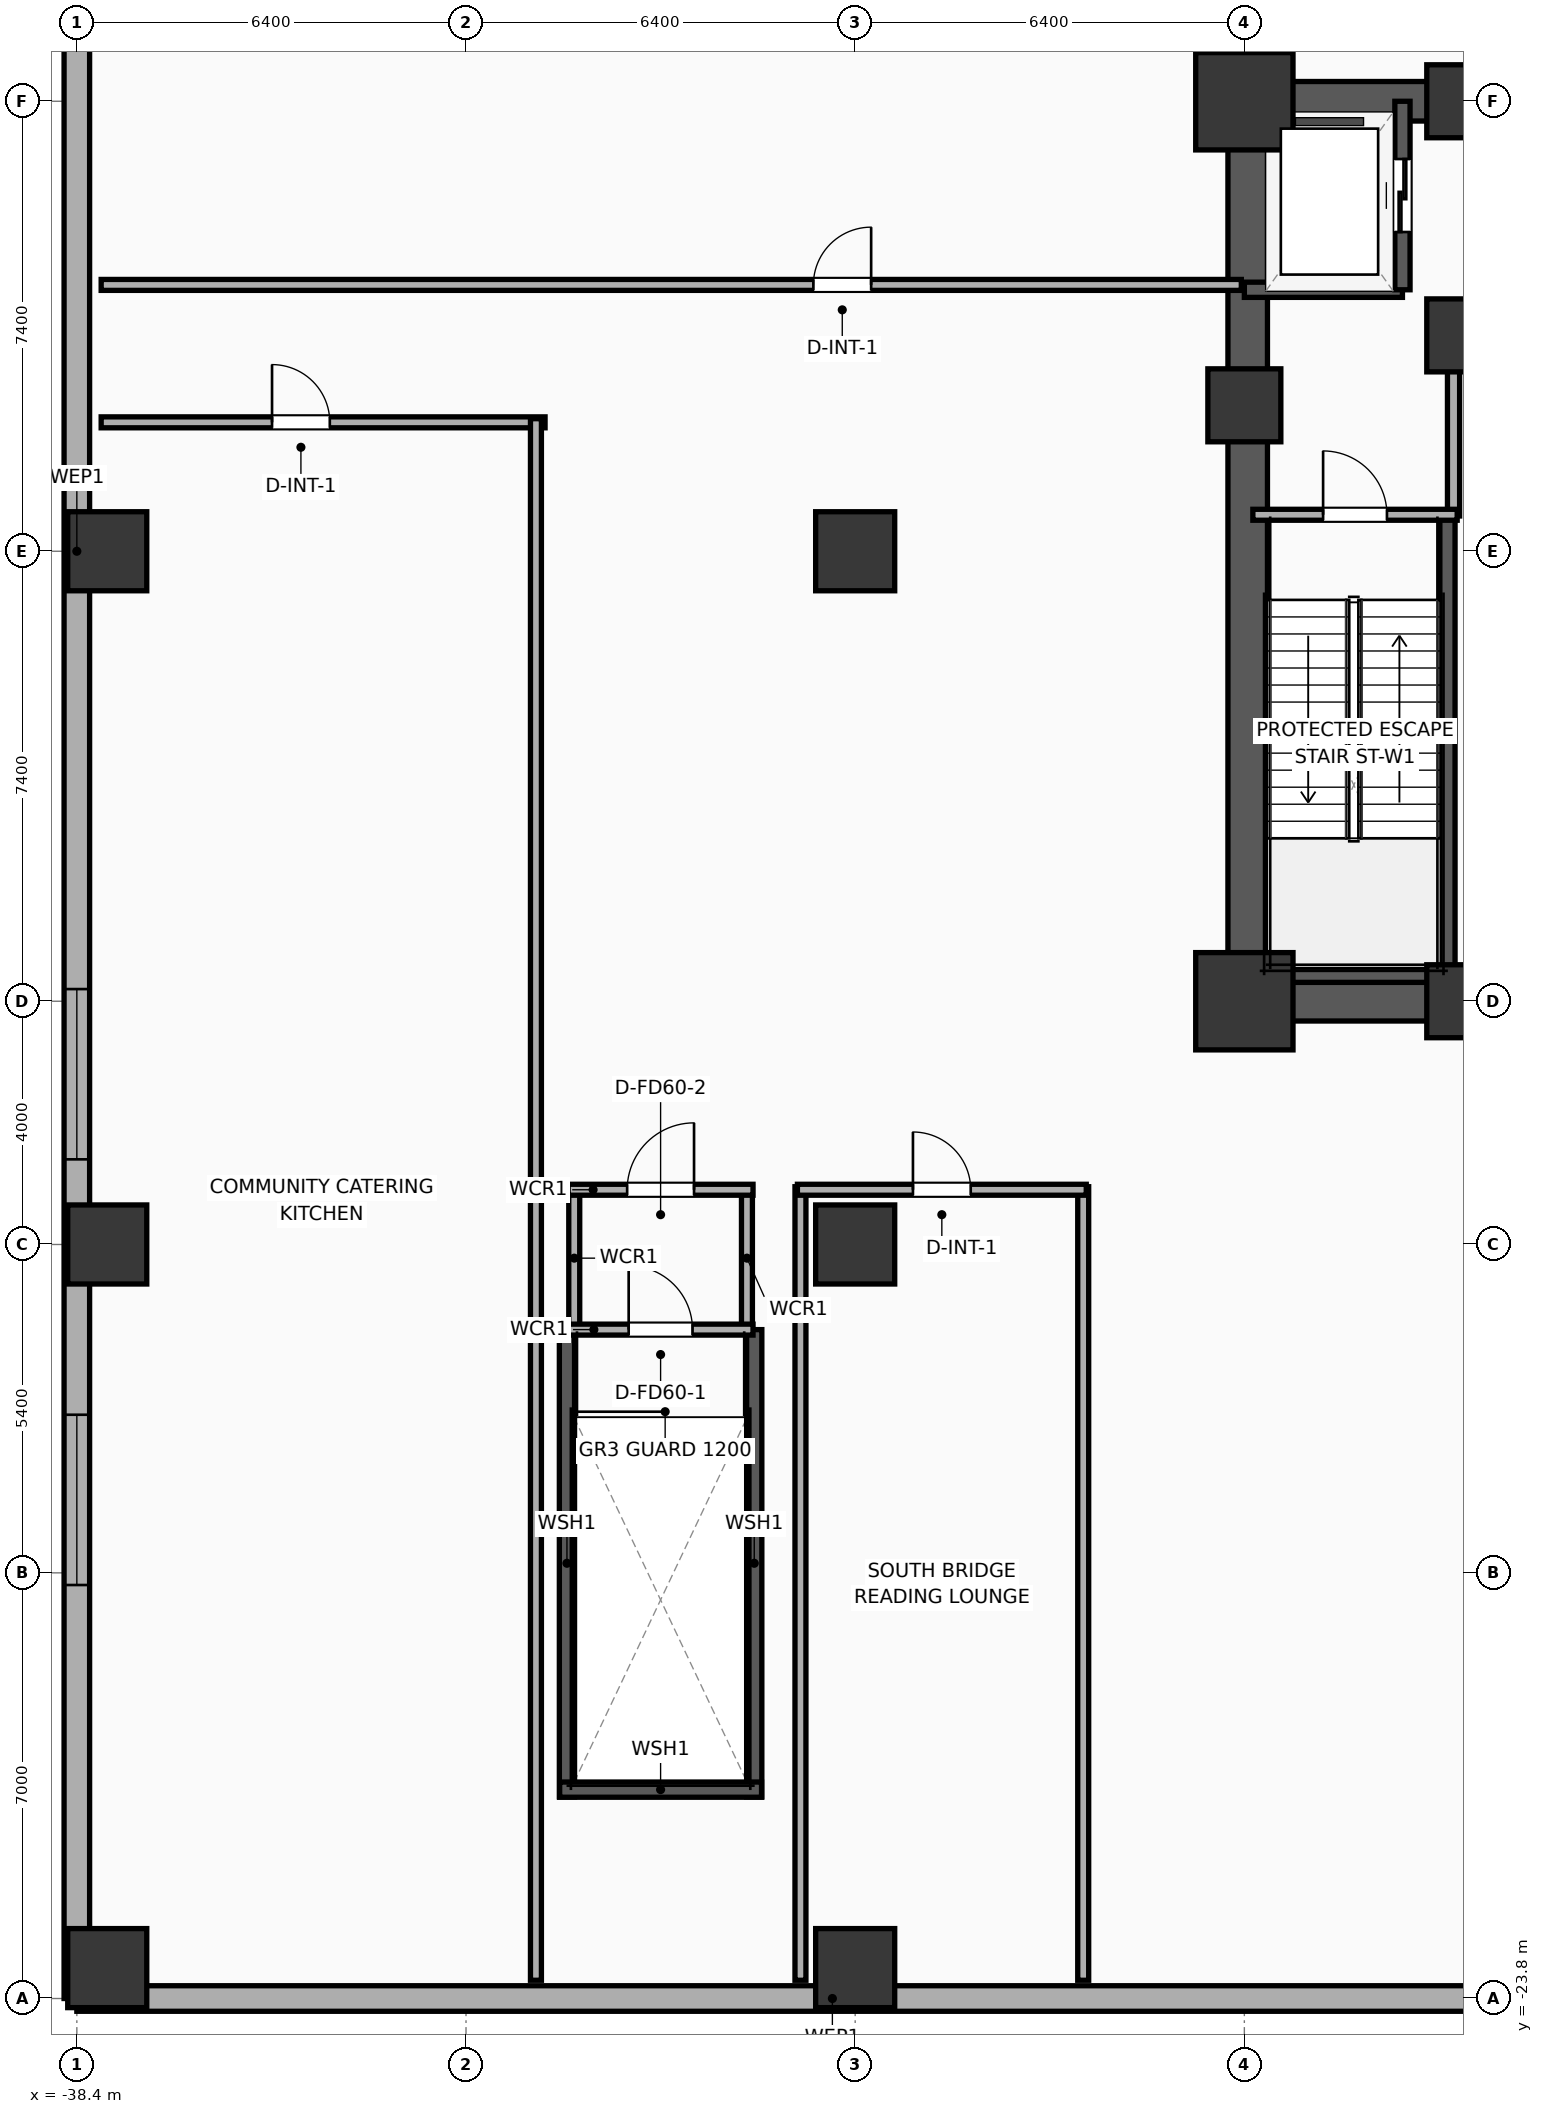
"""IFC4 building model, lengths in metres.
Left out: names, types, materials, properties, quantities, classifications, styles, units other than length and angle.
Written with IfcOpenShell. Run it as: python <this file> out.ifc"""

import sys

from ifc_helpers import new_model, si_unit, direction, frame, frame_2d, origin, origin_2d, place, context, subcontext, project, spatial, rectangle, extrude, element, fill, save


model = new_model("IFC4")
c1 = context("Model", 3, precision=1e-05, world=origin(), true_north=direction((0.0, 1.0)))
c2 = subcontext(c1, "Body", "Model", "MODEL_VIEW")
j1 = project(units=[si_unit("LENGTHUNIT", "METRE"), si_unit("PLANEANGLEUNIT", "RADIAN")], contexts=[c1])
p1 = place(None, origin())
s1 = spatial("IfcSite", under=j1, at=p1, CompositionType="ELEMENT")
p2 = place(p1, origin())
s2 = spatial("IfcBuilding", under=s1, at=p2, CompositionType="ELEMENT")
p3 = place(p2, frame((0.0, 0.0, 20.8)))
s3 = spatial("IfcBuildingStorey", under=s2, at=p3, CompositionType="ELEMENT", Elevation=20.8)
p4 = place(p3, frame((-19.2, -7.4, 0.0), z_axis=(0.0, 0.0, 1.0), x_axis=(1.0, 0.0, 0.0)))
e1 = element("IfcColumn", 1, at=p4, inside=s3, PredefinedType="COLUMN", context=c2, shape_type="SweptSolid", body=[
    extrude(rectangle(XDim=1.6, YDim=1.6, at=origin_2d()), origin(), (0.0, 0.0, 1.0), 5.2),
])
p5 = place(p3, frame((-19.2, 2.4, 0.0), z_axis=(0.0, 0.0, 1.0), x_axis=(1.0, 0.0, 0.0)))
e2 = element("IfcColumn", 2, at=p5, inside=s3, PredefinedType="COLUMN", context=c2, shape_type="SweptSolid", body=[
    extrude(rectangle(XDim=1.2, YDim=1.2, at=origin_2d()), origin(), (0.0, 0.0, 1.0), 5.2),
])
p6 = place(p3, frame((-19.2, 7.4, 0.0), z_axis=(0.0, 0.0, 1.0), x_axis=(1.0, 0.0, 0.0)))
e3 = element("IfcColumn", 3, at=p6, inside=s3, PredefinedType="COLUMN", context=c2, shape_type="SweptSolid", body=[
    extrude(rectangle(XDim=1.6, YDim=1.6, at=origin_2d()), origin(), (0.0, 0.0, 1.0), 5.2),
])
for number, where, z_axis, x_axis in (
    (4, (-15.6, -7.4, 0.0), (0.0, 0.0, 1.0), (1.0, 0.0, 0.0)),
    (5, (-15.6, 7.4, 0.0), (0.0, 0.0, 1.0), (1.0, 0.0, 0.0)),
    (6, (-15.6, 3.55, 0.0), (0.0, 0.0, 1.0), (1.0, 0.0, 0.0)),
):
    element("IfcColumn", number, at=place(p3, frame(where, z_axis=z_axis, x_axis=x_axis)), inside=s3, PredefinedType="COLUMN", context=c2, shape_type="SweptSolid", body=[
        extrude(rectangle(XDim=1.2, YDim=1.2, at=origin_2d()), origin(), (0.0, 0.0, 1.0), 5.2),
    ])
for number, where, z_axis, x_axis in (
    (7, (-19.525, -7.4, 0.0), (0.0, 0.0, 1.0), (1.0, 0.0, 0.0)),
    (8, (-19.525, 7.4, 0.0), (0.0, 0.0, 1.0), (1.0, 0.0, 0.0)),
):
    element("IfcWall", number, at=place(p3, frame(where, z_axis=z_axis, x_axis=x_axis)), inside=s3, PredefinedType="SHEAR", context=c2, shape_type="SweptSolid", body=[
        extrude(rectangle(XDim=7.45, YDim=0.65, at=frame_2d((3.725, 0.0))), origin(), (0.0, 0.0, 1.0), 4.95),
    ])
p7 = place(p3, frame((-19.145, -7.4, 0.0), z_axis=(0.0, 0.0, 1.0), x_axis=(0.0, 1.0, 0.0)))
e9 = element("IfcWall", 9, at=p7, inside=s3, PredefinedType="SHEAR", context=c2, shape_type="SweptSolid", body=[
    extrude(rectangle(XDim=14.8, YDim=0.65, at=frame_2d((7.4, 0.0))), origin(), (0.0, 0.0, 1.0), 4.95),
])
p8 = place(p3, frame((-15.86, -7.085, 0.0), z_axis=(0.0, 0.0, 1.0), x_axis=(0.0, 1.0, 0.0)))
e10 = element("IfcWall", 10, at=p8, inside=s3, PredefinedType="SOLIDWALL", context=c2, shape_type="SweptSolid", body=[
    extrude(rectangle(XDim=7.685, YDim=0.25, at=frame_2d((3.843, 0.0))), origin(), (0.0, 0.0, 1.0), 4.95),
])
p9 = place(p3, frame((-19.2, -6.965, 0.0), z_axis=(0.0, 0.0, 1.0), x_axis=(1.0, 0.0, 0.0)))
e11 = element("IfcWall", 11, at=p9, inside=s3, PredefinedType="SOLIDWALL", context=c2, shape_type="SweptSolid", body=[
    extrude(rectangle(XDim=3.46, YDim=0.25, at=frame_2d((1.73, 0.0))), origin(), (0.0, 0.0, 1.0), 4.95),
])
for number, where, z_axis, x_axis in (
    (12, (-30.34, -20.485, 0.0), (0.0, 0.0, 1.0), (0.0, 1.0, 0.0)),
    (13, (-27.26, -20.485, 0.0), (0.0, 0.0, 1.0), (0.0, 1.0, 0.0)),
):
    element("IfcWall", number, at=place(p3, frame(where, z_axis=z_axis, x_axis=x_axis)), inside=s3, PredefinedType="SOLIDWALL", context=c2, shape_type="SweptSolid", body=[
        extrude(rectangle(XDim=7.685, YDim=0.25, at=frame_2d((3.843, 0.0))), origin(), (0.0, 0.0, 1.0), 4.95),
    ])
p10 = place(p3, frame((-30.46, -20.365, 0.0), z_axis=(0.0, 0.0, 1.0), x_axis=(1.0, 0.0, 0.0)))
e14 = element("IfcWall", 14, at=p10, inside=s3, PredefinedType="SOLIDWALL", context=c2, shape_type="SweptSolid", body=[
    extrude(rectangle(XDim=3.32, YDim=0.25, at=frame_2d((1.66, 0.0))), origin(), (0.0, 0.0, 1.0), 4.95),
])
for number, where, z_axis, x_axis in (
    (15, (-37.9, -23.3, 0.0), (0.0, 0.0, 1.0), (1.0, 0.0, 0.0)),
    (16, (-37.9, -11.4, 0.0), (0.0, 0.0, 1.0), (1.0, 0.0, 0.0)),
    (17, (-37.9, 0.0, 0.0), (0.0, 0.0, 1.0), (1.0, 0.0, 0.0)),
    (18, (-25.6, -23.3, 0.0), (0.0, 0.0, 1.0), (1.0, 0.0, 0.0)),
    (19, (-25.6, -11.4, 0.0), (0.0, 0.0, 1.0), (1.0, 0.0, 0.0)),
    (20, (-25.6, 0.0, 0.0), (0.0, 0.0, 1.0), (1.0, 0.0, 0.0)),
):
    element("IfcColumn", number, at=place(p3, frame(where, z_axis=z_axis, x_axis=x_axis)), inside=s3, PredefinedType="COLUMN", context=c2, shape_type="SweptSolid", body=[
        extrude(rectangle(XDim=1.3, YDim=1.3, at=origin_2d()), origin(), (0.0, 0.0, 1.0), 5.2),
    ])
p11 = place(p3, frame((-38.4, -23.8, 0.0), z_axis=(0.0, 0.0, 1.0), x_axis=(1.0, 0.0, 0.0)))
e21 = element("IfcWall", 21, at=p11, inside=s3, PredefinedType="ELEMENTEDWALL", context=c2, shape_type="SweptSolid", body=[
    extrude(rectangle(XDim=24.85, YDim=0.42, at=frame_2d((12.425, 0.0))), origin(), (0.0, 0.0, 1.0), 3.84),
])
p12 = place(p3, frame((-38.4, 23.8, 0.0), z_axis=(0.0, 0.0, 1.0), x_axis=(0.0, -1.0, 0.0)))
e22 = element("IfcWall", 22, at=p12, inside=s3, PredefinedType="ELEMENTEDWALL", context=c2, shape_type="SweptSolid", body=[
    extrude(rectangle(XDim=47.6, YDim=0.42, at=frame_2d((23.8, 0.0))), origin(), (0.0, 0.0, 1.0), 4.95),
])
p13 = place(p12, frame((3.0, 0.0, 0.65)))
e23 = element("IfcOpeningElement", 23, at=p13, cuts=e22, PredefinedType="OPENING", context=c2, shape_type="SweptSolid", body=[
    extrude(rectangle(XDim=2.8, YDim=2.6, at=frame_2d((1.4, 1.3))), frame((0.0, 0.22, 0.0), z_axis=(0.0, -1.0, 0.0), x_axis=(1.0, 0.0, 0.0)), (0.0, 0.0, 1.0), 0.44),
])
p14 = place(p12, frame((31.0, 0.0, 0.65)))
e24 = element("IfcOpeningElement", 24, at=p14, cuts=e22, PredefinedType="OPENING", context=c2, shape_type="SweptSolid", body=[
    extrude(rectangle(XDim=2.8, YDim=2.6, at=frame_2d((1.4, 1.3))), frame((0.0, 0.22, 0.0), z_axis=(0.0, -1.0, 0.0), x_axis=(1.0, 0.0, 0.0)), (0.0, 0.0, 1.0), 0.44),
])
p15 = place(p12, frame((38.0, 0.0, 0.65)))
e25 = element("IfcOpeningElement", 25, at=p15, cuts=e22, PredefinedType="OPENING", context=c2, shape_type="SweptSolid", body=[
    extrude(rectangle(XDim=2.8, YDim=2.6, at=frame_2d((1.4, 1.3))), frame((0.0, 0.22, 0.0), z_axis=(0.0, -1.0, 0.0), x_axis=(1.0, 0.0, 0.0)), (0.0, 0.0, 1.0), 0.44),
])
p16 = place(p3, frame((-19.2, 4.3, 0.0), z_axis=(0.0, 0.0, 1.0), x_axis=(1.0, 0.0, 0.0)))
e26 = element("IfcWall", 26, at=p16, inside=s3, PredefinedType="SOLIDWALL", context=c2, shape_type="SweptSolid", body=[
    extrude(rectangle(XDim=2.6, YDim=0.25, at=frame_2d((1.3, 0.0))), origin(), (0.0, 0.0, 1.0), 4.95),
])
p17 = place(p3, frame((-16.6, 4.3, 0.0), z_axis=(0.0, 0.0, 1.0), x_axis=(0.0, 1.0, 0.0)))
e27 = element("IfcWall", 27, at=p17, inside=s3, PredefinedType="SOLIDWALL", context=c2, shape_type="SweptSolid", body=[
    extrude(rectangle(XDim=3.1, YDim=0.25, at=frame_2d((1.55, 0.0))), origin(), (0.0, 0.0, 1.0), 4.95),
])
p18 = place(p17, frame((0.95, 0.0, 0.0)))
e28 = element("IfcOpeningElement", 28, at=p18, cuts=e27, PredefinedType="OPENING", context=c2, shape_type="SweptSolid", body=[
    extrude(rectangle(XDim=1.2, YDim=2.05, at=frame_2d((0.6, 1.025))), frame((0.0, 0.135, 0.0), z_axis=(0.0, -1.0, 0.0), x_axis=(1.0, 0.0, 0.0)), (0.0, 0.0, 1.0), 0.27),
])
p19 = place(p3, frame((-15.76, 0.58, 0.0), z_axis=(0.0, 0.0, 1.0), x_axis=(0.0, 1.0, 0.0)))
e29 = element("IfcWall", 29, at=p19, inside=s3, PredefinedType="PARTITIONING", context=c2, shape_type="SweptSolid", body=[
    extrude(rectangle(XDim=2.52, YDim=0.2, at=frame_2d((1.26, 0.0))), origin(), (0.0, 0.0, 1.0), 4.95),
])
p20 = place(p3, frame((-15.82, 3.06, 0.0), z_axis=(0.0, 0.0, 1.0), x_axis=(1.0, 0.0, 0.0)))
e30 = element("IfcWall", 30, at=p20, inside=s3, PredefinedType="PARTITIONING", context=c2, shape_type="SweptSolid", body=[
    extrude(rectangle(XDim=3.16, YDim=0.2, at=frame_2d((1.58, 0.0))), origin(), (0.0, 0.0, 1.0), 4.95),
])
p21 = place(p3, frame((-19.06, 0.6, 0.0), z_axis=(0.0, 0.0, 1.0), x_axis=(1.0, 0.0, 0.0)))
e31 = element("IfcWall", 31, at=p21, inside=s3, PredefinedType="PARTITIONING", context=c2, shape_type="SweptSolid", body=[
    extrude(rectangle(XDim=3.36, YDim=0.18, at=frame_2d((1.68, 0.0))), origin(), (0.0, 0.0, 1.0), 4.95),
])
p22 = place(p21, frame((1.155, 0.0, 0.0)))
e32 = element("IfcOpeningElement", 32, at=p22, cuts=e31, PredefinedType="OPENING", context=c2, shape_type="SweptSolid", body=[
    extrude(rectangle(XDim=1.05, YDim=2.05, at=frame_2d((0.525, 1.025))), frame((0.0, 0.1, 0.0), z_axis=(0.0, -1.0, 0.0), x_axis=(1.0, 0.0, 0.0)), (0.0, 0.0, 1.0), 0.2),
])
for number, where, z_axis, x_axis in (
    (33, (-30.22, -12.8, 0.0), (0.0, 0.0, 1.0), (0.0, 1.0, 0.0)),
    (34, (-27.38, -12.8, 0.0), (0.0, 0.0, 1.0), (0.0, 1.0, 0.0)),
):
    element("IfcWall", number, at=place(p3, frame(where, z_axis=z_axis, x_axis=x_axis)), inside=s3, PredefinedType="PARTITIONING", context=c2, shape_type="SweptSolid", body=[
        extrude(rectangle(XDim=2.35, YDim=0.18, at=frame_2d((1.175, 0.0))), origin(), (0.0, 0.0, 1.0), 4.95),
    ])
p23 = place(p3, frame((-30.32, -12.8, 0.0), z_axis=(0.0, 0.0, 1.0), x_axis=(1.0, 0.0, 0.0)))
e35 = element("IfcWall", 35, at=p23, inside=s3, PredefinedType="PARTITIONING", context=c2, shape_type="SweptSolid", body=[
    extrude(rectangle(XDim=3.04, YDim=0.18, at=frame_2d((1.52, 0.0))), origin(), (0.0, 0.0, 1.0), 4.95),
])
p24 = place(p23, frame((0.995, 0.0, 0.0)))
e36 = element("IfcOpeningElement", 36, at=p24, cuts=e35, PredefinedType="OPENING", context=c2, shape_type="SweptSolid", body=[
    extrude(rectangle(XDim=1.05, YDim=2.05, at=frame_2d((0.525, 1.025))), frame((0.0, 0.1, 0.0), z_axis=(0.0, -1.0, 0.0), x_axis=(1.0, 0.0, 0.0)), (0.0, 0.0, 1.0), 0.2),
])
p25 = place(p3, frame((-30.32, -10.5, 0.0), z_axis=(0.0, 0.0, 1.0), x_axis=(1.0, 0.0, 0.0)))
e37 = element("IfcWall", 37, at=p25, inside=s3, PredefinedType="PARTITIONING", context=c2, shape_type="SweptSolid", body=[
    extrude(rectangle(XDim=3.04, YDim=0.18, at=frame_2d((1.52, 0.0))), origin(), (0.0, 0.0, 1.0), 4.95),
])
p26 = place(p25, frame((0.97, 0.0, 0.0)))
e38 = element("IfcOpeningElement", 38, at=p26, cuts=e37, PredefinedType="OPENING", context=c2, shape_type="SweptSolid", body=[
    extrude(rectangle(XDim=1.1, YDim=2.05, at=frame_2d((0.55, 1.025))), frame((0.0, 0.1, 0.0), z_axis=(0.0, -1.0, 0.0), x_axis=(1.0, 0.0, 0.0)), (0.0, 0.0, 1.0), 0.2),
])
for number, where, z_axis, x_axis in (
    (39, (-26.5, -23.5, 0.0), (0.0, 0.0, 1.0), (0.0, 1.0, 0.0)),
    (40, (-21.85, -23.5, 0.0), (0.0, 0.0, 1.0), (0.0, 1.0, 0.0)),
):
    element("IfcWall", number, at=place(p3, frame(where, z_axis=z_axis, x_axis=x_axis)), inside=s3, PredefinedType="PARTITIONING", context=c2, shape_type="SweptSolid", body=[
        extrude(rectangle(XDim=13.05, YDim=0.18, at=frame_2d((6.525, 0.0))), origin(), (0.0, 0.0, 1.0), 4.95),
    ])
p27 = place(p3, frame((-26.55, -10.5, 0.0), z_axis=(0.0, 0.0, 1.0), x_axis=(1.0, 0.0, 0.0)))
e41 = element("IfcWall", 41, at=p27, inside=s3, PredefinedType="PARTITIONING", context=c2, shape_type="SweptSolid", body=[
    extrude(rectangle(XDim=4.75, YDim=0.18, at=frame_2d((2.375, 0.0))), origin(), (0.0, 0.0, 1.0), 4.95),
])
p28 = place(p27, frame((1.9, 0.0, 0.0)))
e42 = element("IfcOpeningElement", 42, at=p28, cuts=e41, PredefinedType="OPENING", context=c2, shape_type="SweptSolid", body=[
    extrude(rectangle(XDim=0.95, YDim=2.05, at=frame_2d((0.475, 1.025))), frame((0.0, 0.1, 0.0), z_axis=(0.0, -1.0, 0.0), x_axis=(1.0, 0.0, 0.0)), (0.0, 0.0, 1.0), 0.2),
])
p29 = place(p3, frame((-38.0, 2.12, 0.0), z_axis=(0.0, 0.0, 1.0), x_axis=(1.0, 0.0, 0.0)))
e43 = element("IfcWall", 43, at=p29, inside=s3, PredefinedType="PARTITIONING", context=c2, shape_type="SweptSolid", body=[
    extrude(rectangle(XDim=7.3, YDim=0.18, at=frame_2d((3.65, 0.0))), origin(), (0.0, 0.0, 1.0), 4.95),
])
p30 = place(p29, frame((2.81, 0.0, 0.0)))
e44 = element("IfcOpeningElement", 44, at=p30, cuts=e43, PredefinedType="OPENING", context=c2, shape_type="SweptSolid", body=[
    extrude(rectangle(XDim=0.95, YDim=2.05, at=frame_2d((0.475, 1.025))), frame((0.0, 0.1, 0.0), z_axis=(0.0, -1.0, 0.0), x_axis=(1.0, 0.0, 0.0)), (0.0, 0.0, 1.0), 0.2),
])
p31 = place(p3, frame((-30.85, -23.5, 0.0), z_axis=(0.0, 0.0, 1.0), x_axis=(0.0, 1.0, 0.0)))
e45 = element("IfcWall", 45, at=p31, inside=s3, PredefinedType="PARTITIONING", context=c2, shape_type="SweptSolid", body=[
    extrude(rectangle(XDim=25.68, YDim=0.18, at=frame_2d((12.84, 0.0))), origin(), (0.0, 0.0, 1.0), 4.95),
])
p32 = place(p3, frame((-38.0, 4.38, 0.0), z_axis=(0.0, 0.0, 1.0), x_axis=(1.0, 0.0, 0.0)))
e46 = element("IfcWall", 46, at=p32, inside=s3, PredefinedType="PARTITIONING", context=c2, shape_type="SweptSolid", body=[
    extrude(rectangle(XDim=18.75, YDim=0.18, at=frame_2d((9.375, 0.0))), origin(), (0.0, 0.0, 1.0), 4.95),
])
p33 = place(p32, frame((11.712, 0.0, 0.0)))
e47 = element("IfcOpeningElement", 47, at=p33, cuts=e46, PredefinedType="OPENING", context=c2, shape_type="SweptSolid", body=[
    extrude(rectangle(XDim=0.95, YDim=2.05, at=frame_2d((0.475, 1.025))), frame((0.0, 0.1, 0.0), z_axis=(0.0, -1.0, 0.0), x_axis=(1.0, 0.0, 0.0)), (0.0, 0.0, 1.0), 0.2),
])
p34 = place(p14, origin())
e48 = element("IfcWindow", 48, at=p34, inside=s3, PartitioningType="SINGLE_PANEL", PredefinedType="WINDOW", context=c2, shape_type="SweptSolid", body=[
    extrude(rectangle(XDim=2.8, YDim=2.6, at=frame_2d((1.4, 1.3))), frame((0.0, 0.03, 0.0), z_axis=(0.0, -1.0, 0.0), x_axis=(1.0, 0.0, 0.0)), (0.0, 0.0, 1.0), 0.06),
])
fill(e24, e48)
p35 = place(p15, origin())
e49 = element("IfcWindow", 49, at=p35, inside=s3, PartitioningType="SINGLE_PANEL", PredefinedType="WINDOW", context=c2, shape_type="SweptSolid", body=[
    extrude(rectangle(XDim=2.8, YDim=2.6, at=frame_2d((1.4, 1.3))), frame((0.0, 0.03, 0.0), z_axis=(0.0, -1.0, 0.0), x_axis=(1.0, 0.0, 0.0)), (0.0, 0.0, 1.0), 0.06),
])
fill(e25, e49)
p36 = place(p18, origin())
e50 = element("IfcDoor", 50, at=p36, inside=s3, OperationType="SLIDING_TO_LEFT", PredefinedType="DOOR", context=c2, shape_type="SweptSolid", body=[
    extrude(rectangle(XDim=1.2, YDim=2.05, at=frame_2d((0.6, 1.025))), frame((0.0, 0.025, 0.0), z_axis=(0.0, -1.0, 0.0), x_axis=(1.0, 0.0, 0.0)), (0.0, 0.0, 1.0), 0.05),
])
fill(e28, e50)
p37 = place(p22, origin())
e51 = element("IfcDoor", 51, at=p37, inside=s3, OperationType="SINGLE_SWING_LEFT", PredefinedType="DOOR", context=c2, shape_type="SweptSolid", body=[
    extrude(rectangle(XDim=1.05, YDim=2.05, at=frame_2d((0.525, 1.025))), frame((0.0, 0.025, 0.0), z_axis=(0.0, -1.0, 0.0), x_axis=(1.0, 0.0, 0.0)), (0.0, 0.0, 1.0), 0.05),
])
fill(e32, e51)
p38 = place(p24, origin())
e52 = element("IfcDoor", 52, at=p38, inside=s3, OperationType="SINGLE_SWING_LEFT", PredefinedType="DOOR", context=c2, shape_type="SweptSolid", body=[
    extrude(rectangle(XDim=1.05, YDim=2.05, at=frame_2d((0.525, 1.025))), frame((0.0, 0.025, 0.0), z_axis=(0.0, -1.0, 0.0), x_axis=(1.0, 0.0, 0.0)), (0.0, 0.0, 1.0), 0.05),
])
fill(e36, e52)
p39 = place(p26, origin())
e53 = element("IfcDoor", 53, at=p39, inside=s3, OperationType="SINGLE_SWING_RIGHT", PredefinedType="DOOR", context=c2, shape_type="SweptSolid", body=[
    extrude(rectangle(XDim=1.1, YDim=2.05, at=frame_2d((0.55, 1.025))), frame((0.0, 0.025, 0.0), z_axis=(0.0, -1.0, 0.0), x_axis=(1.0, 0.0, 0.0)), (0.0, 0.0, 1.0), 0.05),
])
fill(e38, e53)
p40 = place(p28, origin())
e54 = element("IfcDoor", 54, at=p40, inside=s3, OperationType="SINGLE_SWING_LEFT", PredefinedType="DOOR", context=c2, shape_type="SweptSolid", body=[
    extrude(rectangle(XDim=0.95, YDim=2.05, at=frame_2d((0.475, 1.025))), frame((0.0, 0.025, 0.0), z_axis=(0.0, -1.0, 0.0), x_axis=(1.0, 0.0, 0.0)), (0.0, 0.0, 1.0), 0.05),
])
fill(e42, e54)
p41 = place(p30, origin())
e55 = element("IfcDoor", 55, at=p41, inside=s3, OperationType="SINGLE_SWING_LEFT", PredefinedType="DOOR", context=c2, shape_type="SweptSolid", body=[
    extrude(rectangle(XDim=0.95, YDim=2.05, at=frame_2d((0.475, 1.025))), frame((0.0, 0.025, 0.0), z_axis=(0.0, -1.0, 0.0), x_axis=(1.0, 0.0, 0.0)), (0.0, 0.0, 1.0), 0.05),
])
fill(e44, e55)
p42 = place(p33, origin())
e56 = element("IfcDoor", 56, at=p42, inside=s3, OperationType="SINGLE_SWING_RIGHT", PredefinedType="DOOR", context=c2, shape_type="SweptSolid", body=[
    extrude(rectangle(XDim=0.95, YDim=2.05, at=frame_2d((0.475, 1.025))), frame((0.0, 0.025, 0.0), z_axis=(0.0, -1.0, 0.0), x_axis=(1.0, 0.0, 0.0)), (0.0, 0.0, 1.0), 0.05),
])
fill(e47, e56)
save(model, sys.argv[1])
